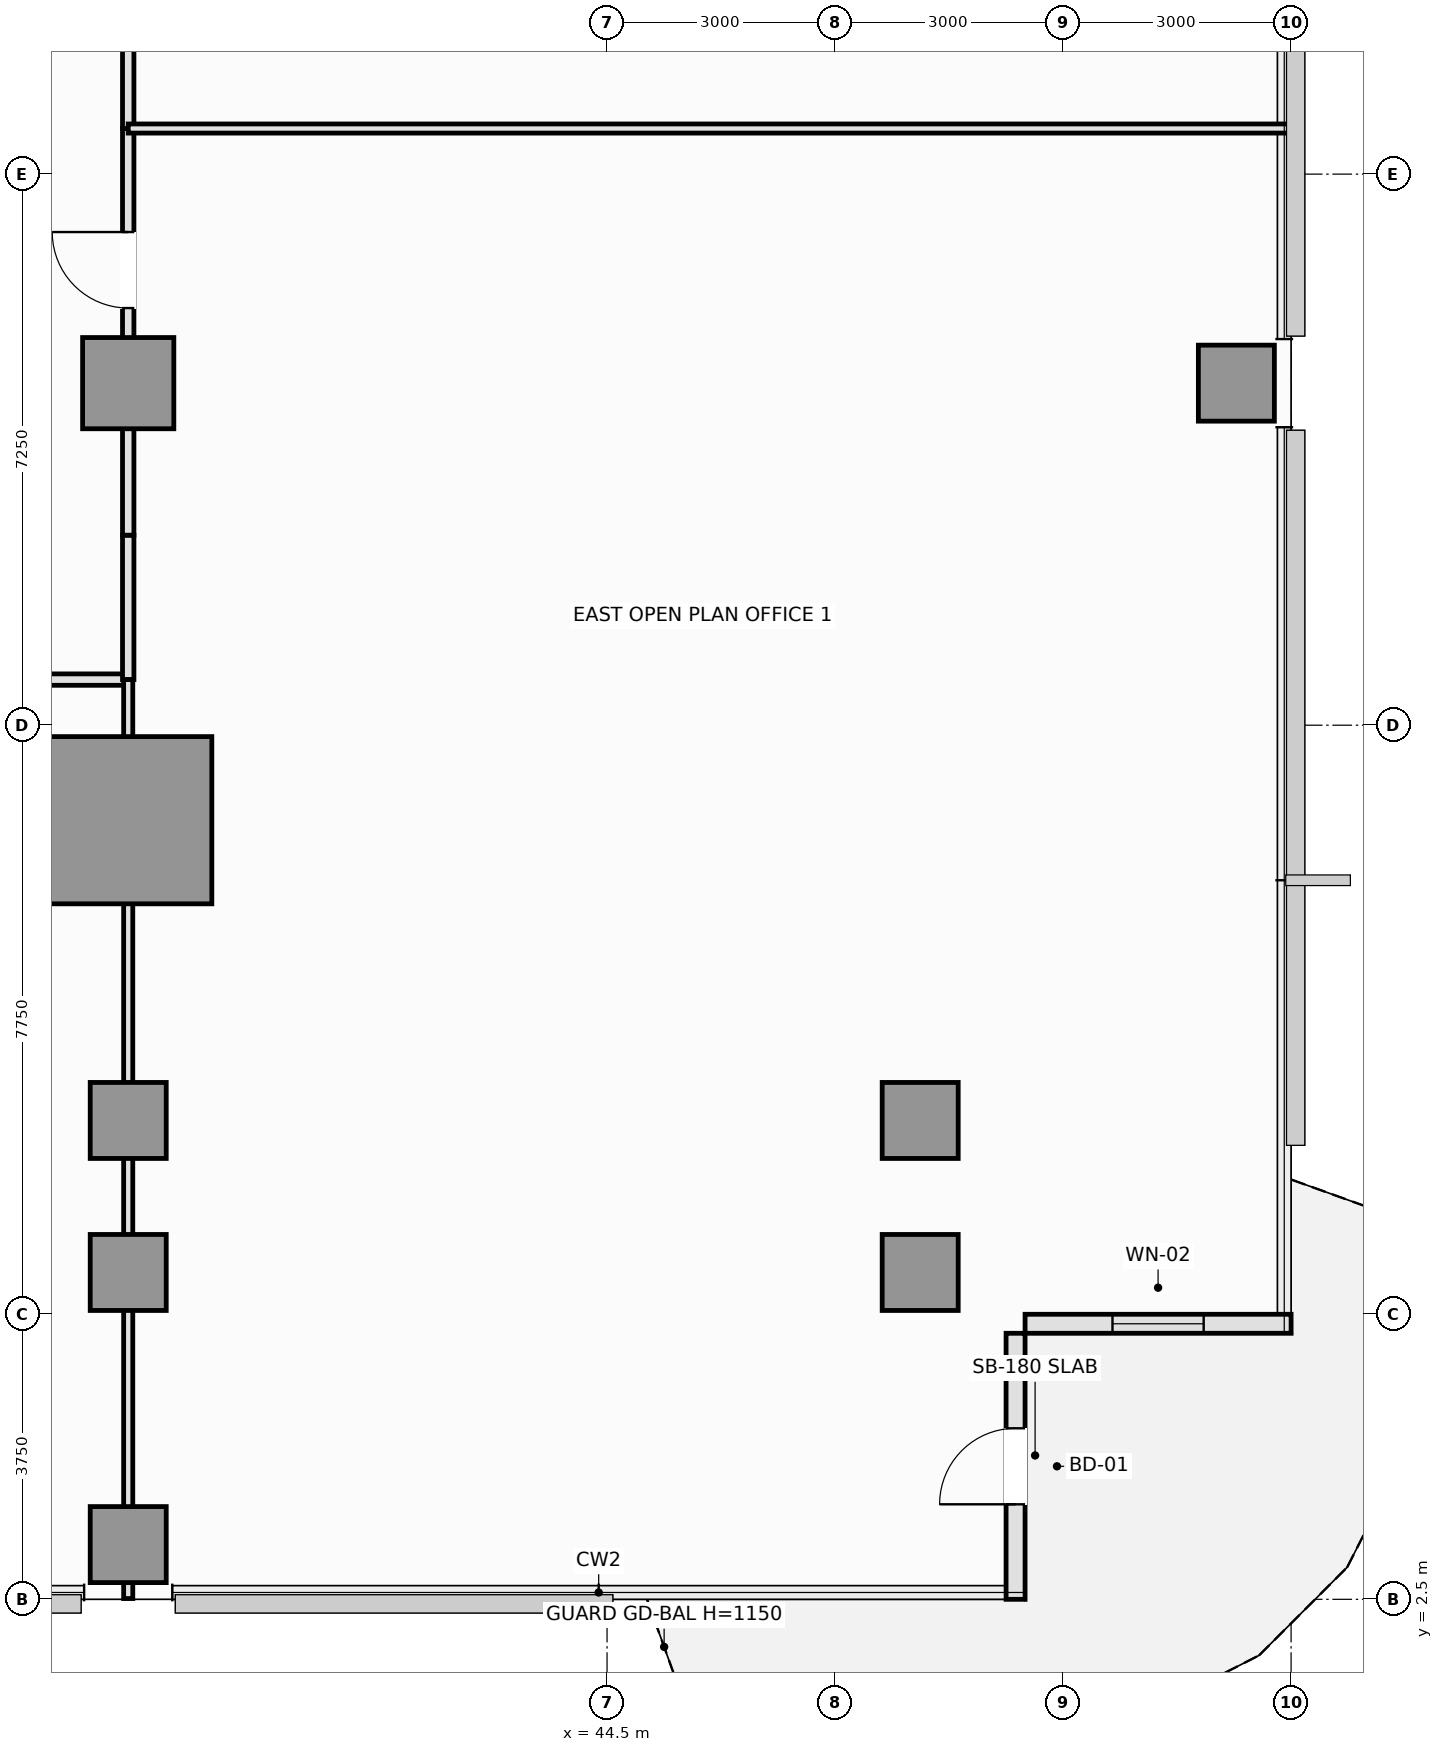
"""IFC4 building model, lengths in metres.
Left out: names, types, materials, properties, quantities, classifications, styles, units other than length and angle.
Written with IfcOpenShell. Run it as: python <this file> out.ifc"""

import sys

from ifc_helpers import new_model, si_unit, direction, frame, frame_2d, origin, origin_2d, place, context, subcontext, project, spatial, rectangle, extrude, element, fill, save


model = new_model("IFC4")
c1 = context("Model", 3, precision=1e-05, world=origin(), true_north=direction((0.0, 1.0)))
c2 = subcontext(c1, "Body", "Model", "MODEL_VIEW")
j1 = project(units=[si_unit("LENGTHUNIT", "METRE"), si_unit("PLANEANGLEUNIT", "RADIAN")], contexts=[c1])
p1 = place(None, origin())
s1 = spatial("IfcSite", under=j1, at=p1, CompositionType="ELEMENT")
p2 = place(p1, origin())
s2 = spatial("IfcBuilding", under=s1, at=p2, CompositionType="ELEMENT")
p3 = place(p2, frame((0.0, 0.0, 64.65)))
s3 = spatial("IfcBuildingStorey", under=s2, at=p3, CompositionType="ELEMENT", Elevation=64.65)
p4 = place(p3, frame((38.2, 12.75, 0.0), z_axis=(0.0, 0.0, 1.0), x_axis=(1.0, 0.0, 0.0)))
e1 = element("IfcColumn", 1, at=p4, inside=s3, PredefinedType="COLUMN", context=c2, shape_type="SweptSolid", body=[
    extrude(rectangle(XDim=2.2, YDim=2.2, at=origin_2d()), origin(), (0.0, 0.0, 1.0), 3.55),
])
p5 = place(p3, frame((38.2, 18.5, 0.0), z_axis=(0.0, 0.0, 1.0), x_axis=(1.0, 0.0, 0.0)))
e2 = element("IfcColumn", 2, at=p5, inside=s3, PredefinedType="COLUMN", context=c2, shape_type="SweptSolid", body=[
    extrude(rectangle(XDim=1.2, YDim=1.2, at=origin_2d()), origin(), (0.0, 0.0, 1.0), 3.55),
])
for number, where, z_axis, x_axis in (
    (3, (48.62, 6.8, 0.0), (0.0, 0.0, 1.0), (1.0, 0.0, 0.0)),
    (4, (38.2, 6.8, 0.0), (0.0, 0.0, 1.0), (1.0, 0.0, 0.0)),
    (5, (38.2, 8.8, 0.0), (0.0, 0.0, 1.0), (1.0, 0.0, 0.0)),
    (6, (48.62, 8.8, 0.0), (0.0, 0.0, 1.0), (1.0, 0.0, 0.0)),
    (7, (52.78, 18.5, 0.0), (0.0, 0.0, 1.0), (1.0, 0.0, 0.0)),
    (8, (38.2, 3.22, 0.0), (0.0, 0.0, 1.0), (1.0, 0.0, 0.0)),
):
    element("IfcColumn", number, at=place(p3, frame(where, z_axis=z_axis, x_axis=x_axis)), inside=s3, PredefinedType="COLUMN", context=c2, shape_type="SweptSolid", body=[
        extrude(rectangle(XDim=1.0, YDim=1.0, at=origin_2d()), origin(), (0.0, 0.0, 1.0), 3.55),
    ])
p6 = place(p3, frame((49.875, 2.5, 0.0), z_axis=(0.0, 0.0, 1.0), x_axis=(0.0, 1.0, 0.0)))
e9 = element("IfcWall", 9, at=p6, inside=s3, PredefinedType="SOLIDWALL", context=c2, shape_type="SweptSolid", body=[
    extrude(rectangle(XDim=3.5, YDim=0.25, at=frame_2d((1.75, 0.0))), origin(), (0.0, 0.0, 1.0), 3.07),
])
p7 = place(p6, frame((1.25, 0.0, 0.0)))
e10 = element("IfcOpeningElement", 10, at=p7, cuts=e9, PredefinedType="OPENING", context=c2, shape_type="SweptSolid", body=[
    extrude(rectangle(XDim=1.0, YDim=2.2, at=frame_2d((0.5, 1.1))), frame((0.0, 0.135, 0.0), z_axis=(0.0, -1.0, 0.0), x_axis=(1.0, 0.0, 0.0)), (0.0, 0.0, 1.0), 0.27),
])
p8 = place(p3, frame((50.0, 6.125, 0.0), z_axis=(0.0, 0.0, 1.0), x_axis=(1.0, 0.0, 0.0)))
e11 = element("IfcWall", 11, at=p8, inside=s3, PredefinedType="SOLIDWALL", context=c2, shape_type="SweptSolid", body=[
    extrude(rectangle(XDim=3.5, YDim=0.25, at=frame_2d((1.75, 0.0))), origin(), (0.0, 0.0, 1.0), 3.07),
])
p9 = place(p8, frame((1.15, 0.0, 0.9)))
e12 = element("IfcOpeningElement", 12, at=p9, cuts=e11, PredefinedType="OPENING", context=c2, shape_type="SweptSolid", body=[
    extrude(rectangle(XDim=1.2, YDim=1.8, at=frame_2d((0.6, 0.9))), frame((0.0, 0.135, 0.0), z_axis=(0.0, -1.0, 0.0), x_axis=(1.0, 0.0, 0.0)), (0.0, 0.0, 1.0), 0.27),
])
p10 = place(p3, frame((33.0, 14.6, 0.0), z_axis=(0.0, 0.0, 1.0), x_axis=(1.0, 0.0, 0.0)))
e13 = element("IfcWall", 13, at=p10, inside=s3, PredefinedType="PARTITIONING", context=c2, shape_type="SweptSolid", body=[
    extrude(rectangle(XDim=5.2, YDim=0.15, at=frame_2d((2.6, 0.0))), origin(), (0.0, 0.0, 1.0), 3.37),
])
p11 = place(p10, frame((2.1, 0.0, 0.0)))
e14 = element("IfcOpeningElement", 14, at=p11, cuts=e13, PredefinedType="OPENING", context=c2, shape_type="SweptSolid", body=[
    extrude(rectangle(XDim=1.0, YDim=2.15, at=frame_2d((0.5, 1.075))), frame((0.0, 0.085, 0.0), z_axis=(0.0, -1.0, 0.0), x_axis=(1.0, 0.0, 0.0)), (0.0, 0.0, 1.0), 0.17),
])
p12 = place(p3, frame((38.2, 14.6, 0.0), z_axis=(0.0, 0.0, 1.0), x_axis=(0.0, 1.0, 0.0)))
e15 = element("IfcWall", 15, at=p12, inside=s3, PredefinedType="PARTITIONING", context=c2, shape_type="SweptSolid", body=[
    extrude(rectangle(XDim=1.9, YDim=0.15, at=frame_2d((0.95, 0.0))), origin(), (0.0, 0.0, 1.0), 2.82),
])
p13 = place(p3, frame((38.2, 16.5, 0.0), z_axis=(0.0, 0.0, 1.0), x_axis=(0.0, 1.0, 0.0)))
e16 = element("IfcWall", 16, at=p13, inside=s3, PredefinedType="PARTITIONING", context=c2, shape_type="SweptSolid", body=[
    extrude(rectangle(XDim=5.35, YDim=0.15, at=frame_2d((2.675, 0.0))), origin(), (0.0, 0.0, 1.0), 2.82),
])
p14 = place(p13, frame((2.988, 0.0, 0.0)))
e17 = element("IfcOpeningElement", 17, at=p14, cuts=e16, PredefinedType="OPENING", context=c2, shape_type="SweptSolid", body=[
    extrude(rectangle(XDim=1.0, YDim=2.15, at=frame_2d((0.5, 1.075))), frame((0.0, 0.085, 0.0), z_axis=(0.0, -1.0, 0.0), x_axis=(1.0, 0.0, 0.0)), (0.0, 0.0, 1.0), 0.17),
])
p15 = place(p3, frame((38.2, 21.85, 0.0), z_axis=(0.0, 0.0, 1.0), x_axis=(0.0, 1.0, 0.0)))
e18 = element("IfcWall", 18, at=p15, inside=s3, PredefinedType="PARTITIONING", context=c2, shape_type="SweptSolid", body=[
    extrude(rectangle(XDim=3.4, YDim=0.15, at=frame_2d((1.7, 0.0))), origin(), (0.0, 0.0, 1.0), 2.82),
])
p16 = place(p15, frame((1.2, 0.0, 0.0)))
e19 = element("IfcOpeningElement", 19, at=p16, cuts=e18, PredefinedType="OPENING", context=c2, shape_type="SweptSolid", body=[
    extrude(rectangle(XDim=1.0, YDim=2.15, at=frame_2d((0.5, 1.075))), frame((0.0, 0.085, 0.0), z_axis=(0.0, -1.0, 0.0), x_axis=(1.0, 0.0, 0.0)), (0.0, 0.0, 1.0), 0.17),
])
p17 = place(p3, frame((38.2, 2.51, 0.0), z_axis=(0.0, 0.0, 1.0), x_axis=(0.0, 1.0, 0.0)))
e20 = element("IfcWall", 20, at=p17, inside=s3, PredefinedType="PARTITIONING", context=c2, shape_type="SweptSolid", body=[
    extrude(rectangle(XDim=12.09, YDim=0.12, at=frame_2d((6.045, 0.0))), origin(), (0.0, 0.0, 1.0), 2.82),
])
p18 = place(p3, frame((38.2, 21.85, 0.0), z_axis=(0.0, 0.0, 1.0), x_axis=(1.0, 0.0, 0.0)))
e21 = element("IfcWall", 21, at=p18, inside=s3, PredefinedType="PARTITIONING", context=c2, shape_type="SweptSolid", body=[
    extrude(rectangle(XDim=15.29, YDim=0.12, at=frame_2d((7.645, 0.0))), origin(), (0.0, 0.0, 1.0), 3.37),
])
p19 = place(p7, frame((1.0, 0.0, 0.0), z_axis=(0.0, 0.0, 1.0), x_axis=(-1.0, 0.0, 0.0)))
e22 = element("IfcDoor", 22, at=p19, inside=s3, OperationType="SINGLE_SWING_LEFT", PredefinedType="DOOR", context=c2, shape_type="SweptSolid", body=[
    extrude(rectangle(XDim=1.0, YDim=2.2, at=frame_2d((0.5, 1.1))), frame((0.0, 0.025, 0.0), z_axis=(0.0, -1.0, 0.0), x_axis=(1.0, 0.0, 0.0)), (0.0, 0.0, 1.0), 0.05),
])
fill(e10, e22)
p20 = place(p9, origin())
e23 = element("IfcWindow", 23, at=p20, inside=s3, PartitioningType="SINGLE_PANEL", PredefinedType="WINDOW", context=c2, shape_type="SweptSolid", body=[
    extrude(rectangle(XDim=1.2, YDim=1.8, at=frame_2d((0.6, 0.9))), frame((0.0, 0.03, 0.0), z_axis=(0.0, -1.0, 0.0), x_axis=(1.0, 0.0, 0.0)), (0.0, 0.0, 1.0), 0.06),
])
fill(e12, e23)
p21 = place(p14, origin())
e24 = element("IfcDoor", 24, at=p21, inside=s3, OperationType="SINGLE_SWING_RIGHT", PredefinedType="DOOR", context=c2, shape_type="SweptSolid", body=[
    extrude(rectangle(XDim=1.0, YDim=2.15, at=frame_2d((0.5, 1.075))), frame((0.0, 0.025, 0.0), z_axis=(0.0, -1.0, 0.0), x_axis=(1.0, 0.0, 0.0)), (0.0, 0.0, 1.0), 0.05),
])
fill(e17, e24)
save(model, sys.argv[1])
